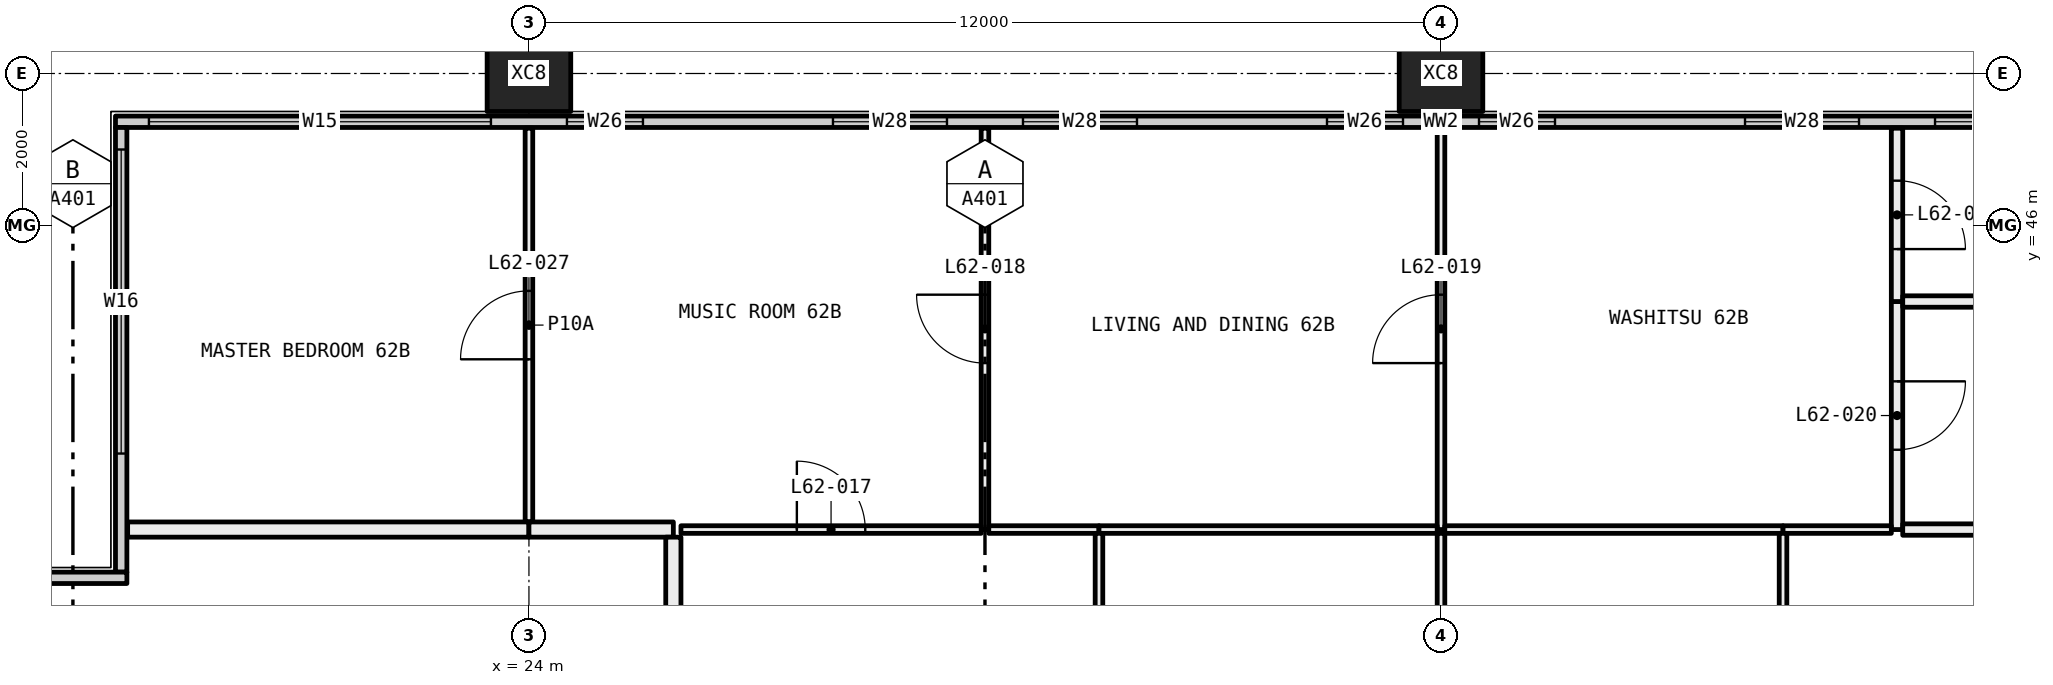
"""IFC4 building model, lengths in metres.
Left out: names, types, materials, properties, quantities, classifications, styles, units other than length and angle.
Written with IfcOpenShell. Run it as: python <this file> out.ifc"""

import sys

from ifc_helpers import new_model, si_unit, direction, frame, frame_2d, origin, origin_2d, place, context, subcontext, project, spatial, rectangle, hollow_rectangle, extrude, element, fill, save


model = new_model("IFC4")
c1 = context("Model", 3, precision=1e-05, world=origin(), true_north=direction((0.0, 1.0)))
c2 = subcontext(c1, "Body", "Model", "MODEL_VIEW")
j1 = project(units=[si_unit("LENGTHUNIT", "METRE"), si_unit("PLANEANGLEUNIT", "RADIAN")], contexts=[c1])
p1 = place(None, origin())
s1 = spatial("IfcSite", under=j1, at=p1, CompositionType="ELEMENT")
p2 = place(p1, origin())
s2 = spatial("IfcBuilding", under=s1, at=p2, CompositionType="ELEMENT")
p3 = place(p2, frame((0.0, 0.0, 231.75)))
s3 = spatial("IfcBuildingStorey", under=s2, at=p3, CompositionType="ELEMENT", Elevation=231.75)
for number, where, z_axis, x_axis in (
    (1, (24.0, 48.0, -0.4), (0.0, 0.0, 1.0), (1.0, 0.0, 0.0)),
    (2, (36.0, 48.0, -0.4), (0.0, 0.0, 1.0), (1.0, 0.0, 0.0)),
):
    element("IfcColumn", number, at=place(p3, frame(where, z_axis=z_axis, x_axis=x_axis)), inside=s3, PredefinedType="COLUMN", context=c2, shape_type="SweptSolid", body=[
        extrude(hollow_rectangle(XDim=1.1, YDim=1.0, WallThickness=0.04, at=origin_2d()), origin(), (0.0, 0.0, 1.0), 3.45),
    ])
p4 = place(p3, frame((18.56, 47.365, 0.0), z_axis=(0.0, 0.0, 1.0), x_axis=(1.0, 0.0, 0.0)))
e3 = element("IfcWall", 3, at=p4, inside=s3, PredefinedType="ELEMENTEDWALL", context=c2, shape_type="SweptSolid", body=[
    extrude(rectangle(XDim=34.88, YDim=0.15, at=frame_2d((17.44, 0.0))), origin(), (0.0, 0.0, 1.0), 3.05),
])
p5 = place(p4, frame((0.44, 0.0, 0.45)))
e4 = element("IfcOpeningElement", 4, at=p5, cuts=e3, PredefinedType="OPENING", context=c2, shape_type="SweptSolid", body=[
    extrude(rectangle(XDim=4.5, YDim=2.55, at=frame_2d((2.25, 1.275))), frame((0.0, 0.085, 0.0), z_axis=(0.0, -1.0, 0.0), x_axis=(1.0, 0.0, 0.0)), (0.0, 0.0, 1.0), 0.17),
])
p6 = place(p4, frame((5.94, 0.0, 0.45)))
e5 = element("IfcOpeningElement", 5, at=p6, cuts=e3, PredefinedType="OPENING", context=c2, shape_type="SweptSolid", body=[
    extrude(rectangle(XDim=1.0, YDim=2.55, at=frame_2d((0.5, 1.275))), frame((0.0, 0.085, 0.0), z_axis=(0.0, -1.0, 0.0), x_axis=(1.0, 0.0, 0.0)), (0.0, 0.0, 1.0), 0.17),
])
p7 = place(p4, frame((9.44, 0.0, 0.45)))
e6 = element("IfcOpeningElement", 6, at=p7, cuts=e3, PredefinedType="OPENING", context=c2, shape_type="SweptSolid", body=[
    extrude(rectangle(XDim=1.5, YDim=2.55, at=frame_2d((0.75, 1.275))), frame((0.0, 0.085, 0.0), z_axis=(0.0, -1.0, 0.0), x_axis=(1.0, 0.0, 0.0)), (0.0, 0.0, 1.0), 0.17),
])
p8 = place(p4, frame((11.94, 0.0, 0.45)))
e7 = element("IfcOpeningElement", 7, at=p8, cuts=e3, PredefinedType="OPENING", context=c2, shape_type="SweptSolid", body=[
    extrude(rectangle(XDim=1.5, YDim=2.55, at=frame_2d((0.75, 1.275))), frame((0.0, 0.085, 0.0), z_axis=(0.0, -1.0, 0.0), x_axis=(1.0, 0.0, 0.0)), (0.0, 0.0, 1.0), 0.17),
])
p9 = place(p4, frame((15.94, 0.0, 0.45)))
e8 = element("IfcOpeningElement", 8, at=p9, cuts=e3, PredefinedType="OPENING", context=c2, shape_type="SweptSolid", body=[
    extrude(rectangle(XDim=1.0, YDim=2.55, at=frame_2d((0.5, 1.275))), frame((0.0, 0.085, 0.0), z_axis=(0.0, -1.0, 0.0), x_axis=(1.0, 0.0, 0.0)), (0.0, 0.0, 1.0), 0.17),
])
p10 = place(p4, frame((17.94, 0.0, 0.45)))
e9 = element("IfcOpeningElement", 9, at=p10, cuts=e3, PredefinedType="OPENING", context=c2, shape_type="SweptSolid", body=[
    extrude(rectangle(XDim=1.0, YDim=2.55, at=frame_2d((0.5, 1.275))), frame((0.0, 0.085, 0.0), z_axis=(0.0, -1.0, 0.0), x_axis=(1.0, 0.0, 0.0)), (0.0, 0.0, 1.0), 0.17),
])
p11 = place(p4, frame((21.44, 0.0, 0.45)))
e10 = element("IfcOpeningElement", 10, at=p11, cuts=e3, PredefinedType="OPENING", context=c2, shape_type="SweptSolid", body=[
    extrude(rectangle(XDim=1.5, YDim=2.55, at=frame_2d((0.75, 1.275))), frame((0.0, 0.085, 0.0), z_axis=(0.0, -1.0, 0.0), x_axis=(1.0, 0.0, 0.0)), (0.0, 0.0, 1.0), 0.17),
])
p12 = place(p4, frame((23.94, 0.0, 0.45)))
e11 = element("IfcOpeningElement", 11, at=p12, cuts=e3, PredefinedType="OPENING", context=c2, shape_type="SweptSolid", body=[
    extrude(rectangle(XDim=1.5, YDim=2.55, at=frame_2d((0.75, 1.275))), frame((0.0, 0.085, 0.0), z_axis=(0.0, -1.0, 0.0), x_axis=(1.0, 0.0, 0.0)), (0.0, 0.0, 1.0), 0.17),
])
p13 = place(p4, frame((27.94, 0.0, 0.45)))
e12 = element("IfcOpeningElement", 12, at=p13, cuts=e3, PredefinedType="OPENING", context=c2, shape_type="SweptSolid", body=[
    extrude(rectangle(XDim=1.0, YDim=2.55, at=frame_2d((0.5, 1.275))), frame((0.0, 0.085, 0.0), z_axis=(0.0, -1.0, 0.0), x_axis=(1.0, 0.0, 0.0)), (0.0, 0.0, 1.0), 0.17),
])
p14 = place(p4, frame((29.94, 0.0, 0.45)))
e13 = element("IfcOpeningElement", 13, at=p14, cuts=e3, PredefinedType="OPENING", context=c2, shape_type="SweptSolid", body=[
    extrude(rectangle(XDim=4.5, YDim=2.55, at=frame_2d((2.25, 1.275))), frame((0.0, 0.085, 0.0), z_axis=(0.0, -1.0, 0.0), x_axis=(1.0, 0.0, 0.0)), (0.0, 0.0, 1.0), 0.17),
])
p15 = place(p3, frame((18.635, 41.44, 0.0), z_axis=(0.0, 0.0, 1.0), x_axis=(0.0, 1.0, 0.0)))
e14 = element("IfcWall", 14, at=p15, inside=s3, PredefinedType="ELEMENTEDWALL", context=c2, shape_type="SweptSolid", body=[
    extrude(rectangle(XDim=5.85, YDim=0.15, at=frame_2d((2.925, 0.0))), origin(), (0.0, 0.0, 1.0), 3.05),
])
p16 = place(p15, frame((1.56, 0.0, 0.45)))
e15 = element("IfcOpeningElement", 15, at=p16, cuts=e14, PredefinedType="OPENING", context=c2, shape_type="SweptSolid", body=[
    extrude(rectangle(XDim=4.0, YDim=2.55, at=frame_2d((2.0, 1.275))), frame((0.0, 0.085, 0.0), z_axis=(0.0, -1.0, 0.0), x_axis=(1.0, 0.0, 0.0)), (0.0, 0.0, 1.0), 0.17),
])
p17 = place(p3, frame((12.56, 41.365, 0.0), z_axis=(0.0, 0.0, 1.0), x_axis=(1.0, 0.0, 0.0)))
e16 = element("IfcWall", 16, at=p17, inside=s3, PredefinedType="ELEMENTEDWALL", context=c2, shape_type="SweptSolid", body=[
    extrude(rectangle(XDim=6.15, YDim=0.15, at=frame_2d((3.075, 0.0))), origin(), (0.0, 0.0, 1.0), 3.05),
])
p18 = place(p17, frame((0.44, 0.0, 0.45)))
e17 = element("IfcOpeningElement", 17, at=p18, cuts=e16, PredefinedType="OPENING", context=c2, shape_type="SweptSolid", body=[
    extrude(rectangle(XDim=4.0, YDim=2.55, at=frame_2d((2.0, 1.275))), frame((0.0, 0.085, 0.0), z_axis=(0.0, -1.0, 0.0), x_axis=(1.0, 0.0, 0.0)), (0.0, 0.0, 1.0), 0.17),
])
p19 = place(p3, frame((24.0, 42.1, 0.0), z_axis=(0.0, 0.0, 1.0), x_axis=(0.0, 1.0, 0.0)))
e18 = element("IfcWall", 18, at=p19, inside=s3, PredefinedType="PARTITIONING", context=c2, shape_type="SweptSolid", body=[
    extrude(rectangle(XDim=5.18, YDim=0.1, at=frame_2d((2.59, 0.0))), origin(), (0.0, 0.0, 1.0), 3.05),
])
p20 = place(p19, frame((2.14, 0.0, 0.0)))
e19 = element("IfcOpeningElement", 19, at=p20, cuts=e18, PredefinedType="OPENING", context=c2, shape_type="SweptSolid", body=[
    extrude(rectangle(XDim=0.9, YDim=2.1, at=frame_2d((0.45, 1.05))), frame((0.0, 0.06, 0.0), z_axis=(0.0, -1.0, 0.0), x_axis=(1.0, 0.0, 0.0)), (0.0, 0.0, 1.0), 0.12),
])
p21 = place(p3, frame((18.72, 42.0, 0.0), z_axis=(0.0, 0.0, 1.0), x_axis=(1.0, 0.0, 0.0)))
e20 = element("IfcWall", 20, at=p21, inside=s3, PredefinedType="PARTITIONING", context=c2, shape_type="SweptSolid", body=[
    extrude(rectangle(XDim=5.28, YDim=0.2, at=frame_2d((2.64, 0.0))), origin(), (0.0, 0.0, 1.0), 3.05),
])
p22 = place(p3, frame((30.0, 42.0, 0.0), z_axis=(0.0, 0.0, 1.0), x_axis=(0.0, 1.0, 0.0)))
e21 = element("IfcWall", 21, at=p22, inside=s3, PredefinedType="PARTITIONING", context=c2, shape_type="SweptSolid", body=[
    extrude(rectangle(XDim=5.28, YDim=0.1, at=frame_2d((2.64, 0.0))), origin(), (0.0, 0.0, 1.0), 3.05),
])
p23 = place(p22, frame((2.19, 0.0, 0.0)))
e22 = element("IfcOpeningElement", 22, at=p23, cuts=e21, PredefinedType="OPENING", context=c2, shape_type="SweptSolid", body=[
    extrude(rectangle(XDim=0.9, YDim=2.1, at=frame_2d((0.45, 1.05))), frame((0.0, 0.06, 0.0), z_axis=(0.0, -1.0, 0.0), x_axis=(1.0, 0.0, 0.0)), (0.0, 0.0, 1.0), 0.12),
])
p24 = place(p3, frame((26.0, 42.0, 0.0), z_axis=(0.0, 0.0, 1.0), x_axis=(1.0, 0.0, 0.0)))
e23 = element("IfcWall", 23, at=p24, inside=s3, PredefinedType="PARTITIONING", context=c2, shape_type="SweptSolid", body=[
    extrude(rectangle(XDim=3.95, YDim=0.1, at=frame_2d((1.975, 0.0))), origin(), (0.0, 0.0, 1.0), 3.05),
])
p25 = place(p24, frame((1.525, 0.0, 0.0)))
e24 = element("IfcOpeningElement", 24, at=p25, cuts=e23, PredefinedType="OPENING", context=c2, shape_type="SweptSolid", body=[
    extrude(rectangle(XDim=0.9, YDim=2.1, at=frame_2d((0.45, 1.05))), frame((0.0, 0.06, 0.0), z_axis=(0.0, -1.0, 0.0), x_axis=(1.0, 0.0, 0.0)), (0.0, 0.0, 1.0), 0.12),
])
p26 = place(p3, frame((24.0, 42.0, 0.0), z_axis=(0.0, 0.0, 1.0), x_axis=(1.0, 0.0, 0.0)))
e25 = element("IfcWall", 25, at=p26, inside=s3, PredefinedType="PARTITIONING", context=c2, shape_type="SweptSolid", body=[
    extrude(rectangle(XDim=1.9, YDim=0.2, at=frame_2d((0.95, 0.0))), origin(), (0.0, 0.0, 1.0), 3.05),
])
p27 = place(p3, frame((36.0, 42.0, 0.0), z_axis=(0.0, 0.0, 1.0), x_axis=(0.0, 1.0, 0.0)))
e26 = element("IfcWall", 26, at=p27, inside=s3, PredefinedType="PARTITIONING", context=c2, shape_type="SweptSolid", body=[
    extrude(rectangle(XDim=5.28, YDim=0.1, at=frame_2d((2.64, 0.0))), origin(), (0.0, 0.0, 1.0), 2.45),
])
p28 = place(p27, frame((2.19, 0.0, 0.0)))
e27 = element("IfcOpeningElement", 27, at=p28, cuts=e26, PredefinedType="OPENING", context=c2, shape_type="SweptSolid", body=[
    extrude(rectangle(XDim=0.9, YDim=2.1, at=frame_2d((0.45, 1.05))), frame((0.0, 0.06, 0.0), z_axis=(0.0, -1.0, 0.0), x_axis=(1.0, 0.0, 0.0)), (0.0, 0.0, 1.0), 0.12),
])
p29 = place(p3, frame((30.05, 42.0, 0.0), z_axis=(0.0, 0.0, 1.0), x_axis=(1.0, 0.0, 0.0)))
e28 = element("IfcWall", 28, at=p29, inside=s3, PredefinedType="PARTITIONING", context=c2, shape_type="SweptSolid", body=[
    extrude(rectangle(XDim=1.45, YDim=0.1, at=frame_2d((0.725, 0.0))), origin(), (0.0, 0.0, 1.0), 3.05),
])
p30 = place(p3, frame((31.5, 42.0, 0.0), z_axis=(0.0, 0.0, 1.0), x_axis=(1.0, 0.0, 0.0)))
e29 = element("IfcWall", 29, at=p30, inside=s3, PredefinedType="PARTITIONING", context=c2, shape_type="SweptSolid", body=[
    extrude(rectangle(XDim=4.45, YDim=0.1, at=frame_2d((2.225, 0.0))), origin(), (0.0, 0.0, 1.0), 2.45),
])
p31 = place(p3, frame((42.0, 42.0, 0.0), z_axis=(0.0, 0.0, 1.0), x_axis=(0.0, 1.0, 0.0)))
e30 = element("IfcWall", 30, at=p31, inside=s3, PredefinedType="PARTITIONING", context=c2, shape_type="SweptSolid", body=[
    extrude(rectangle(XDim=3.0, YDim=0.15, at=frame_2d((1.5, 0.0))), origin(), (0.0, 0.0, 1.0), 3.05),
])
p32 = place(p31, frame((1.05, 0.0, 0.0)))
e31 = element("IfcOpeningElement", 31, at=p32, cuts=e30, PredefinedType="OPENING", context=c2, shape_type="SweptSolid", body=[
    extrude(rectangle(XDim=0.9, YDim=2.1, at=frame_2d((0.45, 1.05))), frame((0.0, 0.085, 0.0), z_axis=(0.0, -1.0, 0.0), x_axis=(1.0, 0.0, 0.0)), (0.0, 0.0, 1.0), 0.17),
])
p33 = place(p3, frame((42.0, 45.0, 0.0), z_axis=(0.0, 0.0, 1.0), x_axis=(0.0, 1.0, 0.0)))
e32 = element("IfcWall", 32, at=p33, inside=s3, PredefinedType="PARTITIONING", context=c2, shape_type="SweptSolid", body=[
    extrude(rectangle(XDim=2.28, YDim=0.15, at=frame_2d((1.14, 0.0))), origin(), (0.0, 0.0, 1.0), 3.05),
])
p34 = place(p33, frame((0.69, 0.0, 0.0)))
e33 = element("IfcOpeningElement", 33, at=p34, cuts=e32, PredefinedType="OPENING", context=c2, shape_type="SweptSolid", body=[
    extrude(rectangle(XDim=0.9, YDim=2.1, at=frame_2d((0.45, 1.05))), frame((0.0, 0.085, 0.0), z_axis=(0.0, -1.0, 0.0), x_axis=(1.0, 0.0, 0.0)), (0.0, 0.0, 1.0), 0.17),
])
p35 = place(p3, frame((36.05, 42.0, 0.0), z_axis=(0.0, 0.0, 1.0), x_axis=(1.0, 0.0, 0.0)))
e34 = element("IfcWall", 34, at=p35, inside=s3, PredefinedType="PARTITIONING", context=c2, shape_type="SweptSolid", body=[
    extrude(rectangle(XDim=4.45, YDim=0.1, at=frame_2d((2.225, 0.0))), origin(), (0.0, 0.0, 1.0), 2.45),
])
p36 = place(p3, frame((40.5, 42.0, 0.0), z_axis=(0.0, 0.0, 1.0), x_axis=(1.0, 0.0, 0.0)))
e35 = element("IfcWall", 35, at=p36, inside=s3, PredefinedType="PARTITIONING", context=c2, shape_type="SweptSolid", body=[
    extrude(rectangle(XDim=1.425, YDim=0.1, at=frame_2d((0.712, 0.0))), origin(), (0.0, 0.0, 1.0), 3.05),
])
p37 = place(p3, frame((47.9, 45.0, 0.0), z_axis=(0.0, 0.0, 1.0), x_axis=(-1.0, 0.0, 0.0)))
e36 = element("IfcWall", 36, at=p37, inside=s3, PredefinedType="PARTITIONING", context=c2, shape_type="SweptSolid", body=[
    extrude(rectangle(XDim=5.825, YDim=0.15, at=frame_2d((2.913, 0.0))), origin(), (0.0, 0.0, 1.0), 3.05),
])
p38 = place(p3, frame((42.075, 42.0, 0.0), z_axis=(0.0, 0.0, 1.0), x_axis=(1.0, 0.0, 0.0)))
e37 = element("IfcWall", 37, at=p38, inside=s3, PredefinedType="PARTITIONING", context=c2, shape_type="SweptSolid", body=[
    extrude(rectangle(XDim=3.925, YDim=0.15, at=frame_2d((1.962, 0.0))), origin(), (0.0, 0.0, 1.0), 3.05),
])
p39 = place(p3, frame((31.5, 36.1, 0.0), z_axis=(0.0, 0.0, 1.0), x_axis=(0.0, 1.0, 0.0)))
e38 = element("IfcWall", 38, at=p39, inside=s3, PredefinedType="PARTITIONING", context=c2, shape_type="SweptSolid", body=[
    extrude(rectangle(XDim=5.85, YDim=0.1, at=frame_2d((2.925, 0.0))), origin(), (0.0, 0.0, 1.0), 3.05),
])
p40 = place(p39, frame((2.475, 0.0, 0.0)))
e39 = element("IfcOpeningElement", 39, at=p40, cuts=e38, PredefinedType="OPENING", context=c2, shape_type="SweptSolid", body=[
    extrude(rectangle(XDim=0.9, YDim=2.1, at=frame_2d((0.45, 1.05))), frame((0.0, 0.06, 0.0), z_axis=(0.0, -1.0, 0.0), x_axis=(1.0, 0.0, 0.0)), (0.0, 0.0, 1.0), 0.12),
])
p41 = place(p3, frame((25.9, 41.9, 0.0), z_axis=(0.0, 0.0, 1.0), x_axis=(0.0, -1.0, 0.0)))
e40 = element("IfcWall", 40, at=p41, inside=s3, PredefinedType="PARTITIONING", context=c2, shape_type="SweptSolid", body=[
    extrude(rectangle(XDim=6.2, YDim=0.2, at=frame_2d((3.1, 0.0))), origin(), (0.0, 0.0, 1.0), 2.45),
])
p42 = place(p3, frame((36.0, 36.55, 0.0), z_axis=(0.0, 0.0, 1.0), x_axis=(0.0, 1.0, 0.0)))
e41 = element("IfcWall", 41, at=p42, inside=s3, PredefinedType="PARTITIONING", context=c2, shape_type="SweptSolid", body=[
    extrude(rectangle(XDim=5.4, YDim=0.1, at=frame_2d((2.7, 0.0))), origin(), (0.0, 0.0, 1.0), 2.45),
])
p43 = place(p42, frame((2.25, 0.0, 0.0)))
e42 = element("IfcOpeningElement", 42, at=p43, cuts=e41, PredefinedType="OPENING", context=c2, shape_type="SweptSolid", body=[
    extrude(rectangle(XDim=0.9, YDim=2.1, at=frame_2d((0.45, 1.05))), frame((0.0, 0.06, 0.0), z_axis=(0.0, -1.0, 0.0), x_axis=(1.0, 0.0, 0.0)), (0.0, 0.0, 1.0), 0.12),
])
p44 = place(p3, frame((40.5, 36.1, 0.0), z_axis=(0.0, 0.0, 1.0), x_axis=(0.0, 1.0, 0.0)))
e43 = element("IfcWall", 43, at=p44, inside=s3, PredefinedType="PARTITIONING", context=c2, shape_type="SweptSolid", body=[
    extrude(rectangle(XDim=5.85, YDim=0.1, at=frame_2d((2.925, 0.0))), origin(), (0.0, 0.0, 1.0), 3.05),
])
p45 = place(p44, frame((2.475, 0.0, 0.0)))
e44 = element("IfcOpeningElement", 44, at=p45, cuts=e43, PredefinedType="OPENING", context=c2, shape_type="SweptSolid", body=[
    extrude(rectangle(XDim=0.9, YDim=2.1, at=frame_2d((0.45, 1.05))), frame((0.0, 0.06, 0.0), z_axis=(0.0, -1.0, 0.0), x_axis=(1.0, 0.0, 0.0)), (0.0, 0.0, 1.0), 0.12),
])
p46 = place(p5, origin())
e45 = element("IfcWindow", 45, at=p46, inside=s3, PartitioningType="SINGLE_PANEL", PredefinedType="WINDOW", context=c2, shape_type="SweptSolid", body=[
    extrude(rectangle(XDim=4.5, YDim=2.55, at=frame_2d((2.25, 1.275))), frame((0.0, 0.03, 0.0), z_axis=(0.0, -1.0, 0.0), x_axis=(1.0, 0.0, 0.0)), (0.0, 0.0, 1.0), 0.06),
])
fill(e4, e45)
p47 = place(p6, origin())
e46 = element("IfcWindow", 46, at=p47, inside=s3, PartitioningType="SINGLE_PANEL", PredefinedType="WINDOW", context=c2, shape_type="SweptSolid", body=[
    extrude(rectangle(XDim=1.0, YDim=2.55, at=frame_2d((0.5, 1.275))), frame((0.0, 0.03, 0.0), z_axis=(0.0, -1.0, 0.0), x_axis=(1.0, 0.0, 0.0)), (0.0, 0.0, 1.0), 0.06),
])
fill(e5, e46)
p48 = place(p7, origin())
e47 = element("IfcWindow", 47, at=p48, inside=s3, PartitioningType="SINGLE_PANEL", PredefinedType="WINDOW", context=c2, shape_type="SweptSolid", body=[
    extrude(rectangle(XDim=1.5, YDim=2.55, at=frame_2d((0.75, 1.275))), frame((0.0, 0.03, 0.0), z_axis=(0.0, -1.0, 0.0), x_axis=(1.0, 0.0, 0.0)), (0.0, 0.0, 1.0), 0.06),
])
fill(e6, e47)
p49 = place(p8, origin())
e48 = element("IfcWindow", 48, at=p49, inside=s3, PartitioningType="SINGLE_PANEL", PredefinedType="WINDOW", context=c2, shape_type="SweptSolid", body=[
    extrude(rectangle(XDim=1.5, YDim=2.55, at=frame_2d((0.75, 1.275))), frame((0.0, 0.03, 0.0), z_axis=(0.0, -1.0, 0.0), x_axis=(1.0, 0.0, 0.0)), (0.0, 0.0, 1.0), 0.06),
])
fill(e7, e48)
p50 = place(p9, origin())
e49 = element("IfcWindow", 49, at=p50, inside=s3, PartitioningType="SINGLE_PANEL", PredefinedType="WINDOW", context=c2, shape_type="SweptSolid", body=[
    extrude(rectangle(XDim=1.0, YDim=2.55, at=frame_2d((0.5, 1.275))), frame((0.0, 0.03, 0.0), z_axis=(0.0, -1.0, 0.0), x_axis=(1.0, 0.0, 0.0)), (0.0, 0.0, 1.0), 0.06),
])
fill(e8, e49)
p51 = place(p10, origin())
e50 = element("IfcWindow", 50, at=p51, inside=s3, PartitioningType="SINGLE_PANEL", PredefinedType="WINDOW", context=c2, shape_type="SweptSolid", body=[
    extrude(rectangle(XDim=1.0, YDim=2.55, at=frame_2d((0.5, 1.275))), frame((0.0, 0.03, 0.0), z_axis=(0.0, -1.0, 0.0), x_axis=(1.0, 0.0, 0.0)), (0.0, 0.0, 1.0), 0.06),
])
fill(e9, e50)
p52 = place(p11, origin())
e51 = element("IfcWindow", 51, at=p52, inside=s3, PartitioningType="SINGLE_PANEL", PredefinedType="WINDOW", context=c2, shape_type="SweptSolid", body=[
    extrude(rectangle(XDim=1.5, YDim=2.55, at=frame_2d((0.75, 1.275))), frame((0.0, 0.03, 0.0), z_axis=(0.0, -1.0, 0.0), x_axis=(1.0, 0.0, 0.0)), (0.0, 0.0, 1.0), 0.06),
])
fill(e10, e51)
p53 = place(p12, origin())
e52 = element("IfcWindow", 52, at=p53, inside=s3, PartitioningType="SINGLE_PANEL", PredefinedType="WINDOW", context=c2, shape_type="SweptSolid", body=[
    extrude(rectangle(XDim=1.5, YDim=2.55, at=frame_2d((0.75, 1.275))), frame((0.0, 0.03, 0.0), z_axis=(0.0, -1.0, 0.0), x_axis=(1.0, 0.0, 0.0)), (0.0, 0.0, 1.0), 0.06),
])
fill(e11, e52)
p54 = place(p16, origin())
e53 = element("IfcWindow", 53, at=p54, inside=s3, PartitioningType="SINGLE_PANEL", PredefinedType="WINDOW", context=c2, shape_type="SweptSolid", body=[
    extrude(rectangle(XDim=4.0, YDim=2.55, at=frame_2d((2.0, 1.275))), frame((0.0, 0.03, 0.0), z_axis=(0.0, -1.0, 0.0), x_axis=(1.0, 0.0, 0.0)), (0.0, 0.0, 1.0), 0.06),
])
fill(e15, e53)
p55 = place(p25, origin())
e54 = element("IfcDoor", 54, at=p55, inside=s3, OperationType="SINGLE_SWING_RIGHT", PredefinedType="DOOR", context=c2, shape_type="SweptSolid", body=[
    extrude(rectangle(XDim=0.9, YDim=2.1, at=frame_2d((0.45, 1.05))), frame((0.0, 0.025, 0.0), z_axis=(0.0, -1.0, 0.0), x_axis=(1.0, 0.0, 0.0)), (0.0, 0.0, 1.0), 0.05),
])
fill(e24, e54)
p56 = place(p23, origin())
e55 = element("IfcDoor", 55, at=p56, inside=s3, OperationType="SINGLE_SWING_LEFT", PredefinedType="DOOR", context=c2, shape_type="SweptSolid", body=[
    extrude(rectangle(XDim=0.9, YDim=2.1, at=frame_2d((0.45, 1.05))), frame((0.0, 0.025, 0.0), z_axis=(0.0, -1.0, 0.0), x_axis=(1.0, 0.0, 0.0)), (0.0, 0.0, 1.0), 0.05),
])
fill(e22, e55)
p57 = place(p28, origin())
e56 = element("IfcDoor", 56, at=p57, inside=s3, OperationType="SINGLE_SWING_RIGHT", PredefinedType="DOOR", context=c2, shape_type="SweptSolid", body=[
    extrude(rectangle(XDim=0.9, YDim=2.1, at=frame_2d((0.45, 1.05))), frame((0.0, 0.025, 0.0), z_axis=(0.0, -1.0, 0.0), x_axis=(1.0, 0.0, 0.0)), (0.0, 0.0, 1.0), 0.05),
])
fill(e27, e56)
p58 = place(p32, frame((0.9, 0.0, 0.0), x_axis=(-1.0, 0.0, 0.0)))
e57 = element("IfcDoor", 57, at=p58, inside=s3, OperationType="SINGLE_SWING_RIGHT", PredefinedType="DOOR", context=c2, shape_type="SweptSolid", body=[
    extrude(rectangle(XDim=0.9, YDim=2.1, at=frame_2d((0.45, 1.05))), frame((0.0, 0.025, 0.0), z_axis=(0.0, -1.0, 0.0), x_axis=(1.0, 0.0, 0.0)), (0.0, 0.0, 1.0), 0.05),
])
fill(e31, e57)
p59 = place(p34, frame((0.9, 0.0, 0.0), x_axis=(-1.0, 0.0, 0.0)))
e58 = element("IfcDoor", 58, at=p59, inside=s3, OperationType="SINGLE_SWING_LEFT", PredefinedType="DOOR", context=c2, shape_type="SweptSolid", body=[
    extrude(rectangle(XDim=0.9, YDim=2.1, at=frame_2d((0.45, 1.05))), frame((0.0, 0.025, 0.0), z_axis=(0.0, -1.0, 0.0), x_axis=(1.0, 0.0, 0.0)), (0.0, 0.0, 1.0), 0.05),
])
fill(e33, e58)
p60 = place(p20, origin())
e59 = element("IfcDoor", 59, at=p60, inside=s3, OperationType="SINGLE_SWING_RIGHT", PredefinedType="DOOR", context=c2, shape_type="SweptSolid", body=[
    extrude(rectangle(XDim=0.9, YDim=2.1, at=frame_2d((0.45, 1.05))), frame((0.0, 0.025, 0.0), z_axis=(0.0, -1.0, 0.0), x_axis=(1.0, 0.0, 0.0)), (0.0, 0.0, 1.0), 0.05),
])
fill(e19, e59)
save(model, sys.argv[1])
